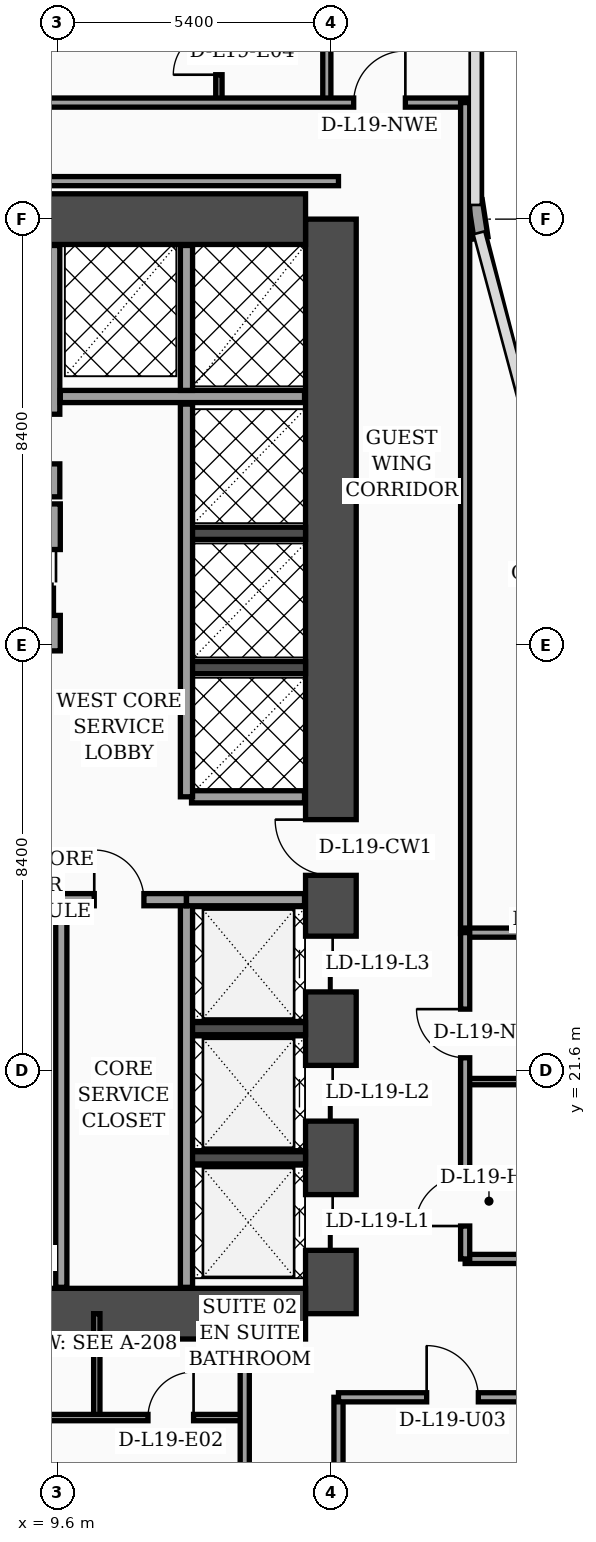
"""IFC4 building model, lengths in metres.
Left out: names, types, materials, properties, quantities, classifications, styles, units other than length and angle.
Written with IfcOpenShell. Run it as: python <this file> out.ifc"""

import sys

from ifc_helpers import new_model, si_unit, direction, frame, frame_2d, origin, place, context, subcontext, project, spatial, rectangle, extrude, element, fill, save


model = new_model("IFC4")
c1 = context("Model", 3, precision=1e-05, world=origin(), true_north=direction((0.0, 1.0)))
c2 = subcontext(c1, "Body", "Model", "MODEL_VIEW")
j1 = project(units=[si_unit("LENGTHUNIT", "METRE"), si_unit("PLANEANGLEUNIT", "RADIAN")], contexts=[c1])
p1 = place(None, origin())
s1 = spatial("IfcSite", under=j1, at=p1, CompositionType="ELEMENT")
p2 = place(p1, origin())
s2 = spatial("IfcBuilding", under=s1, at=p2, CompositionType="ELEMENT")
p3 = place(p2, frame((0.0, 0.0, 81.2)))
s3 = spatial("IfcBuildingStorey", under=s2, at=p3, CompositionType="ELEMENT", Elevation=81.2)
p4 = place(p3, frame((15.0, 16.8, 0.0), z_axis=(0.0, 0.0, 1.0), x_axis=(0.0, 1.0, 0.0)))
e1 = element("IfcWall", 1, at=p4, inside=s3, PredefinedType="SHEAR", context=c2, shape_type="SweptSolid", body=[
    extrude(rectangle(XDim=21.6, YDim=1.0, at=frame_2d((10.8, 0.0))), origin(), (0.0, 0.0, 1.0), 3.56),
])
p5 = place(p4, frame((8.65, 0.0, 0.0)))
e2 = element("IfcOpeningElement", 2, at=p5, cuts=e1, PredefinedType="OPENING", context=c2, shape_type="SweptSolid", body=[
    extrude(rectangle(XDim=1.1, YDim=2.2, at=frame_2d((0.55, 1.1))), frame((0.0, 0.51, 0.0), z_axis=(0.0, -1.0, 0.0), x_axis=(1.0, 0.0, 0.0)), (0.0, 0.0, 1.0), 1.02),
])
p6 = place(p4, frame((1.25, 0.0, 0.0)))
e3 = element("IfcOpeningElement", 3, at=p6, cuts=e1, PredefinedType="OPENING", context=c2, shape_type="SweptSolid", body=[
    extrude(rectangle(XDim=1.1, YDim=2.2, at=frame_2d((0.55, 1.1))), frame((0.0, 0.51, 0.0), z_axis=(0.0, -1.0, 0.0), x_axis=(1.0, 0.0, 0.0)), (0.0, 0.0, 1.0), 1.02),
])
p7 = place(p4, frame((3.8, 0.0, 0.0)))
e4 = element("IfcOpeningElement", 4, at=p7, cuts=e1, PredefinedType="OPENING", context=c2, shape_type="SweptSolid", body=[
    extrude(rectangle(XDim=1.1, YDim=2.2, at=frame_2d((0.55, 1.1))), frame((0.0, 0.51, 0.0), z_axis=(0.0, -1.0, 0.0), x_axis=(1.0, 0.0, 0.0)), (0.0, 0.0, 1.0), 1.02),
])
p8 = place(p4, frame((6.35, 0.0, 0.0)))
e5 = element("IfcOpeningElement", 5, at=p8, cuts=e1, PredefinedType="OPENING", context=c2, shape_type="SweptSolid", body=[
    extrude(rectangle(XDim=1.1, YDim=2.2, at=frame_2d((0.55, 1.1))), frame((0.0, 0.51, 0.0), z_axis=(0.0, -1.0, 0.0), x_axis=(1.0, 0.0, 0.0)), (0.0, 0.0, 1.0), 1.02),
])
for number, where, z_axis, x_axis in (
    (6, (4.7, 38.4, 0.0), (0.0, 0.0, 1.0), (1.0, 0.0, 0.0)),
    (7, (4.7, 16.8, 0.0), (0.0, 0.0, 1.0), (1.0, 0.0, 0.0)),
):
    element("IfcWall", number, at=place(p3, frame(where, z_axis=z_axis, x_axis=x_axis)), inside=s3, PredefinedType="SHEAR", context=c2, shape_type="SweptSolid", body=[
        extrude(rectangle(XDim=9.8, YDim=1.0, at=frame_2d((4.9, 0.0))), origin(), (0.0, 0.0, 1.0), 3.56),
    ])
for number, where, z_axis, x_axis in (
    (8, (12.18, 19.875, 0.0), (0.0, 0.0, 1.0), (1.0, 0.0, 0.0)),
    (9, (12.18, 22.425, 0.0), (0.0, 0.0, 1.0), (1.0, 0.0, 0.0)),
    (10, (12.18, 29.55, 0.0), (0.0, 0.0, 1.0), (1.0, 0.0, 0.0)),
    (11, (12.18, 32.2, 0.0), (0.0, 0.0, 1.0), (1.0, 0.0, 0.0)),
):
    element("IfcWall", number, at=place(p3, frame(where, z_axis=z_axis, x_axis=x_axis)), inside=s3, PredefinedType="SOLIDWALL", context=c2, shape_type="SweptSolid", body=[
        extrude(rectangle(XDim=2.32, YDim=0.24, at=frame_2d((1.16, 0.0))), origin(), (0.0, 0.0, 1.0), 3.56),
    ])
p9 = place(p3, frame((17.962, 38.03, 0.0), z_axis=(0.0, 0.0, 1.0), x_axis=(-0.15141125477, 0.988470855377, 0.0)))
e12 = element("IfcWall", 12, at=p9, inside=s3, PredefinedType="SOLIDWALL", context=c2, shape_type="SweptSolid", body=[
    extrude(rectangle(XDim=0.739, YDim=0.28, at=frame_2d((0.369, 0.0))), origin(), (0.0, 0.0, 1.0), 3.56),
])
p10 = place(p3, frame((9.54, 29.88, 0.0), z_axis=(0.0, 0.0, 1.0), x_axis=(0.0, 1.0, 0.0)))
e13 = element("IfcWall", 13, at=p10, inside=s3, PredefinedType="SOLIDWALL", context=c2, shape_type="SweptSolid", body=[
    extrude(rectangle(XDim=2.9, YDim=0.24, at=frame_2d((1.45, 0.0))), origin(), (0.0, 0.0, 1.0), 3.56),
])
p11 = place(p10, frame((0.7, 0.0, 0.0)))
e14 = element("IfcOpeningElement", 14, at=p11, cuts=e13, PredefinedType="OPENING", context=c2, shape_type="SweptSolid", body=[
    extrude(rectangle(XDim=1.3, YDim=2.35, at=frame_2d((0.65, 1.175))), frame((0.0, 0.13, 0.0), z_axis=(0.0, -1.0, 0.0), x_axis=(1.0, 0.0, 0.0)), (0.0, 0.0, 1.0), 0.26),
])
p12 = place(p3, frame((9.68, 17.32, 0.0), z_axis=(0.0, 0.0, 1.0), x_axis=(0.0, 1.0, 0.0)))
e15 = element("IfcWall", 15, at=p12, inside=s3, PredefinedType="SOLIDWALL", context=c2, shape_type="SweptSolid", body=[
    extrude(rectangle(XDim=7.68, YDim=0.22, at=frame_2d((3.84, 0.0))), origin(), (0.0, 0.0, 1.0), 3.56),
])
p13 = place(p3, frame((9.54, 32.92, 0.0), z_axis=(0.0, 0.0, 1.0), x_axis=(0.0, 1.0, 0.0)))
e16 = element("IfcWall", 16, at=p13, inside=s3, PredefinedType="SOLIDWALL", context=c2, shape_type="SweptSolid", body=[
    extrude(rectangle(XDim=4.96, YDim=0.22, at=frame_2d((2.48, 0.0))), origin(), (0.0, 0.0, 1.0), 3.56),
])
p14 = place(p13, frame((0.65, 0.0, 0.0)))
e17 = element("IfcOpeningElement", 17, at=p14, cuts=e16, PredefinedType="OPENING", context=c2, shape_type="SweptSolid", body=[
    extrude(rectangle(XDim=0.98, YDim=2.15, at=frame_2d((0.49, 1.075))), frame((0.0, 0.12, 0.0), z_axis=(0.0, -1.0, 0.0), x_axis=(1.0, 0.0, 0.0)), (0.0, 0.0, 1.0), 0.24),
])
p15 = place(p3, frame((12.15, 17.32, 0.0), z_axis=(0.0, 0.0, 1.0), x_axis=(0.0, 1.0, 0.0)))
e18 = element("IfcWall", 18, at=p15, inside=s3, PredefinedType="SOLIDWALL", context=c2, shape_type="SweptSolid", body=[
    extrude(rectangle(XDim=7.65, YDim=0.24, at=frame_2d((3.825, 0.0))), origin(), (0.0, 0.0, 1.0), 3.56),
])
p16 = place(p3, frame((9.68, 24.97, 0.0), z_axis=(0.0, 0.0, 1.0), x_axis=(1.0, 0.0, 0.0)))
e19 = element("IfcWall", 19, at=p16, inside=s3, PredefinedType="SOLIDWALL", context=c2, shape_type="SweptSolid", body=[
    extrude(rectangle(XDim=2.47, YDim=0.24, at=frame_2d((1.235, 0.0))), origin(), (0.0, 0.0, 1.0), 3.56),
])
p17 = place(p16, frame((0.65, 0.0, 0.0)))
e20 = element("IfcOpeningElement", 20, at=p17, cuts=e19, PredefinedType="OPENING", context=c2, shape_type="SweptSolid", body=[
    extrude(rectangle(XDim=0.98, YDim=2.15, at=frame_2d((0.49, 1.075))), frame((0.0, 0.13, 0.0), z_axis=(0.0, -1.0, 0.0), x_axis=(1.0, 0.0, 0.0)), (0.0, 0.0, 1.0), 0.26),
])
p18 = place(p3, frame((12.15, 24.97, 0.0), z_axis=(0.0, 0.0, 1.0), x_axis=(1.0, 0.0, 0.0)))
e21 = element("IfcWall", 21, at=p18, inside=s3, PredefinedType="SOLIDWALL", context=c2, shape_type="SweptSolid", body=[
    extrude(rectangle(XDim=2.33, YDim=0.24, at=frame_2d((1.165, 0.0))), origin(), (0.0, 0.0, 1.0), 2.84),
])
p19 = place(p3, frame((12.25, 27.0, 0.0), z_axis=(0.0, 0.0, 1.0), x_axis=(1.0, 0.0, 0.0)))
e22 = element("IfcWall", 22, at=p19, inside=s3, PredefinedType="SOLIDWALL", context=c2, shape_type="SweptSolid", body=[
    extrude(rectangle(XDim=2.23, YDim=0.24, at=frame_2d((1.115, 0.0))), origin(), (0.0, 0.0, 1.0), 3.56),
])
p20 = place(p3, frame((12.15, 27.0, 0.0), z_axis=(0.0, 0.0, 1.0), x_axis=(0.0, 1.0, 0.0)))
e23 = element("IfcWall", 23, at=p20, inside=s3, PredefinedType="SOLIDWALL", context=c2, shape_type="SweptSolid", body=[
    extrude(rectangle(XDim=7.75, YDim=0.24, at=frame_2d((3.875, 0.0))), origin(), (0.0, 0.0, 1.0), 3.56),
])
p21 = place(p3, frame((9.66, 34.9, 0.0), z_axis=(0.0, 0.0, 1.0), x_axis=(1.0, 0.0, 0.0)))
e24 = element("IfcWall", 24, at=p21, inside=s3, PredefinedType="SOLIDWALL", context=c2, shape_type="SweptSolid", body=[
    extrude(rectangle(XDim=4.82, YDim=0.24, at=frame_2d((2.41, 0.0))), origin(), (0.0, 0.0, 1.0), 3.56),
])
p22 = place(p3, frame((12.15, 35.02, 0.0), z_axis=(0.0, 0.0, 1.0), x_axis=(0.0, 1.0, 0.0)))
e25 = element("IfcWall", 25, at=p22, inside=s3, PredefinedType="SOLIDWALL", context=c2, shape_type="SweptSolid", body=[
    extrude(rectangle(XDim=2.86, YDim=0.24, at=frame_2d((1.43, 0.0))), origin(), (0.0, 0.0, 1.0), 3.56),
])
p23 = place(p3, frame((10.38, 14.75, 0.0), z_axis=(0.0, 0.0, 1.0), x_axis=(0.0, 1.0, 0.0)))
e26 = element("IfcWall", 26, at=p23, inside=s3, PredefinedType="PARTITIONING", context=c2, shape_type="SweptSolid", body=[
    extrude(rectangle(XDim=2.05, YDim=0.125, at=frame_2d((1.025, 0.0))), origin(), (0.0, 0.0, 1.0), 3.56),
])
p24 = place(p3, frame((0.08, 14.75, 0.0), z_axis=(0.0, 0.0, 1.0), x_axis=(1.0, 0.0, 0.0)))
e27 = element("IfcWall", 27, at=p24, inside=s3, PredefinedType="PARTITIONING", context=c2, shape_type="SweptSolid", body=[
    extrude(rectangle(XDim=13.22, YDim=0.125, at=frame_2d((6.61, 0.0))), origin(), (0.0, 0.0, 1.0), 2.84),
])
p25 = place(p24, frame((4.67, 0.0, 0.0)))
e28 = element("IfcOpeningElement", 28, at=p25, cuts=e27, PredefinedType="OPENING", context=c2, shape_type="SweptSolid", body=[
    extrude(rectangle(XDim=0.96, YDim=2.2, at=frame_2d((0.48, 1.1))), frame((0.0, 0.073, 0.0), z_axis=(0.0, -1.0, 0.0), x_axis=(1.0, 0.0, 0.0)), (0.0, 0.0, 1.0), 0.145),
])
p26 = place(p24, frame((11.31, 0.0, 0.0)))
e29 = element("IfcOpeningElement", 29, at=p26, cuts=e27, PredefinedType="OPENING", context=c2, shape_type="SweptSolid", body=[
    extrude(rectangle(XDim=0.9, YDim=2.15, at=frame_2d((0.45, 1.075))), frame((0.0, 0.073, 0.0), z_axis=(0.0, -1.0, 0.0), x_axis=(1.0, 0.0, 0.0)), (0.0, 0.0, 1.0), 0.145),
])
p27 = place(p3, frame((13.3, 2.44, 0.0), z_axis=(0.0, 0.0, 1.0), x_axis=(0.0, 1.0, 0.0)))
e30 = element("IfcWall", 30, at=p27, inside=s3, PredefinedType="PARTITIONING", context=c2, shape_type="SweptSolid", body=[
    extrude(rectangle(XDim=14.36, YDim=0.18, at=frame_2d((7.18, 0.0))), origin(), (0.0, 0.0, 1.0), 3.04),
])
p28 = place(p27, frame((3.01, 0.0, 0.0)))
e31 = element("IfcOpeningElement", 31, at=p28, cuts=e30, PredefinedType="OPENING", context=c2, shape_type="SweptSolid", body=[
    extrude(rectangle(XDim=1.02, YDim=2.2, at=frame_2d((0.51, 1.1))), frame((0.0, 0.1, 0.0), z_axis=(0.0, -1.0, 0.0), x_axis=(1.0, 0.0, 0.0)), (0.0, 0.0, 1.0), 0.2),
])
p29 = place(p27, frame((9.95, 0.0, 0.0)))
e32 = element("IfcOpeningElement", 32, at=p29, cuts=e30, PredefinedType="OPENING", context=c2, shape_type="SweptSolid", body=[
    extrude(rectangle(XDim=1.02, YDim=2.2, at=frame_2d((0.51, 1.1))), frame((0.0, 0.1, 0.0), z_axis=(0.0, -1.0, 0.0), x_axis=(1.0, 0.0, 0.0)), (0.0, 0.0, 1.0), 0.2),
])
p30 = place(p3, frame((15.15, 2.44, 0.0), z_axis=(0.0, 0.0, 1.0), x_axis=(0.0, 1.0, 0.0)))
e33 = element("IfcWall", 33, at=p30, inside=s3, PredefinedType="PARTITIONING", context=c2, shape_type="SweptSolid", body=[
    extrude(rectangle(XDim=12.71, YDim=0.18, at=frame_2d((6.355, 0.0))), origin(), (0.0, 0.0, 1.0), 3.04),
])
p31 = place(p3, frame((15.15, 15.15, 0.0), z_axis=(0.0, 0.0, 1.0), x_axis=(1.0, 0.0, 0.0)))
e34 = element("IfcWall", 34, at=p31, inside=s3, PredefinedType="PARTITIONING", context=c2, shape_type="SweptSolid", body=[
    extrude(rectangle(XDim=6.45, YDim=0.18, at=frame_2d((3.225, 0.0))), origin(), (0.0, 0.0, 1.0), 2.34),
])
p32 = place(p31, frame((1.74, 0.0, 0.0)))
e35 = element("IfcOpeningElement", 35, at=p32, cuts=e34, PredefinedType="OPENING", context=c2, shape_type="SweptSolid", body=[
    extrude(rectangle(XDim=1.02, YDim=2.2, at=frame_2d((0.51, 1.1))), frame((0.0, 0.1, 0.0), z_axis=(0.0, -1.0, 0.0), x_axis=(1.0, 0.0, 0.0)), (0.0, 0.0, 1.0), 0.2),
])
p33 = place(p3, frame((14.92, 40.7, 0.0), z_axis=(0.0, 0.0, 1.0), x_axis=(0.0, 1.0, 0.0)))
e36 = element("IfcWall", 36, at=p33, inside=s3, PredefinedType="PARTITIONING", context=c2, shape_type="SweptSolid", body=[
    extrude(rectangle(XDim=7.1, YDim=0.16, at=frame_2d((3.55, 0.0))), origin(), (0.0, 0.0, 1.0), 3.04),
])
p34 = place(p3, frame((12.79, 40.7, 0.0), z_axis=(0.0, 0.0, 1.0), x_axis=(0.0, 1.0, 0.0)))
e37 = element("IfcWall", 37, at=p34, inside=s3, PredefinedType="PARTITIONING", context=c2, shape_type="SweptSolid", body=[
    extrude(rectangle(XDim=10.24, YDim=0.125, at=frame_2d((5.12, 0.0))), origin(), (0.0, 0.0, 1.0), 3.04),
])
p35 = place(p34, frame((0.55, 0.0, 0.0)))
e38 = element("IfcOpeningElement", 38, at=p35, cuts=e37, PredefinedType="OPENING", context=c2, shape_type="SweptSolid", body=[
    extrude(rectangle(XDim=0.9, YDim=2.15, at=frame_2d((0.45, 1.075))), frame((0.0, 0.073, 0.0), z_axis=(0.0, -1.0, 0.0), x_axis=(1.0, 0.0, 0.0)), (0.0, 0.0, 1.0), 0.145),
])
p36 = place(p34, frame((3.62, 0.0, 0.0)))
e39 = element("IfcOpeningElement", 39, at=p36, cuts=e37, PredefinedType="OPENING", context=c2, shape_type="SweptSolid", body=[
    extrude(rectangle(XDim=0.96, YDim=2.2, at=frame_2d((0.48, 1.1))), frame((0.0, 0.073, 0.0), z_axis=(0.0, -1.0, 0.0), x_axis=(1.0, 0.0, 0.0)), (0.0, 0.0, 1.0), 0.145),
])
p37 = place(p3, frame((0.08, 40.7, 0.0), z_axis=(0.0, 0.0, 1.0), x_axis=(1.0, 0.0, 0.0)))
e40 = element("IfcWall", 40, at=p37, inside=s3, PredefinedType="PARTITIONING", context=c2, shape_type="SweptSolid", body=[
    extrude(rectangle(XDim=17.77, YDim=0.18, at=frame_2d((8.885, 0.0))), origin(), (0.0, 0.0, 1.0), 2.84),
])
p38 = place(p37, frame((0.9, 0.0, 0.0)))
e41 = element("IfcOpeningElement", 41, at=p38, cuts=e40, PredefinedType="OPENING", context=c2, shape_type="SweptSolid", body=[
    extrude(rectangle(XDim=1.02, YDim=2.2, at=frame_2d((0.51, 1.1))), frame((0.0, 0.1, 0.0), z_axis=(0.0, -1.0, 0.0), x_axis=(1.0, 0.0, 0.0)), (0.0, 0.0, 1.0), 0.2),
])
p39 = place(p37, frame((7.38, 0.0, 0.0)))
e42 = element("IfcOpeningElement", 42, at=p39, cuts=e40, PredefinedType="OPENING", context=c2, shape_type="SweptSolid", body=[
    extrude(rectangle(XDim=1.02, YDim=2.2, at=frame_2d((0.51, 1.1))), frame((0.0, 0.1, 0.0), z_axis=(0.0, -1.0, 0.0), x_axis=(1.0, 0.0, 0.0)), (0.0, 0.0, 1.0), 0.2),
])
p40 = place(p37, frame((15.37, 0.0, 0.0)))
e43 = element("IfcOpeningElement", 43, at=p40, cuts=e40, PredefinedType="OPENING", context=c2, shape_type="SweptSolid", body=[
    extrude(rectangle(XDim=1.02, YDim=2.2, at=frame_2d((0.51, 1.1))), frame((0.0, 0.1, 0.0), z_axis=(0.0, -1.0, 0.0), x_axis=(1.0, 0.0, 0.0)), (0.0, 0.0, 1.0), 0.2),
])
p41 = place(p3, frame((17.65, 24.3, 0.0), z_axis=(0.0, 0.0, 1.0), x_axis=(0.0, 1.0, 0.0)))
e44 = element("IfcWall", 44, at=p41, inside=s3, PredefinedType="PARTITIONING", context=c2, shape_type="SweptSolid", body=[
    extrude(rectangle(XDim=16.4, YDim=0.18, at=frame_2d((8.2, 0.0))), origin(), (0.0, 0.0, 1.0), 2.84),
])
p42 = place(p3, frame((3.68, 39.15, 0.0), z_axis=(0.0, 0.0, 1.0), x_axis=(1.0, 0.0, 0.0)))
e45 = element("IfcWall", 45, at=p42, inside=s3, PredefinedType="PARTITIONING", context=c2, shape_type="SweptSolid", body=[
    extrude(rectangle(XDim=11.47, YDim=0.18, at=frame_2d((5.735, 0.0))), origin(), (0.0, 0.0, 1.0), 2.84),
])
p43 = place(p3, frame((17.65, 17.88, 0.0), z_axis=(0.0, 0.0, 1.0), x_axis=(1.0, 0.0, 0.0)))
e46 = element("IfcWall", 46, at=p43, inside=s3, PredefinedType="PARTITIONING", context=c2, shape_type="SweptSolid", body=[
    extrude(rectangle(XDim=3.9, YDim=0.18, at=frame_2d((1.95, 0.0))), origin(), (0.0, 0.0, 1.0), 3.09),
])
p44 = place(p3, frame((17.65, 21.38, 0.0), z_axis=(0.0, 0.0, 1.0), x_axis=(1.0, 0.0, 0.0)))
e47 = element("IfcWall", 47, at=p44, inside=s3, PredefinedType="PARTITIONING", context=c2, shape_type="SweptSolid", body=[
    extrude(rectangle(XDim=3.9, YDim=0.125, at=frame_2d((1.95, 0.0))), origin(), (0.0, 0.0, 1.0), 3.56),
])
p45 = place(p3, frame((17.65, 24.32, 0.0), z_axis=(0.0, 0.0, 1.0), x_axis=(1.0, 0.0, 0.0)))
e48 = element("IfcWall", 48, at=p45, inside=s3, PredefinedType="PARTITIONING", context=c2, shape_type="SweptSolid", body=[
    extrude(rectangle(XDim=3.95, YDim=0.18, at=frame_2d((1.975, 0.0))), origin(), (0.0, 0.0, 1.0), 3.56),
])
p46 = place(p3, frame((17.65, 17.88, 0.0), z_axis=(0.0, 0.0, 1.0), x_axis=(0.0, 1.0, 0.0)))
e49 = element("IfcWall", 49, at=p46, inside=s3, PredefinedType="PARTITIONING", context=c2, shape_type="SweptSolid", body=[
    extrude(rectangle(XDim=6.44, YDim=0.18, at=frame_2d((3.22, 0.0))), origin(), (0.0, 0.0, 1.0), 3.09),
])
p47 = place(p46, frame((0.65, 0.0, 0.0)))
e50 = element("IfcOpeningElement", 50, at=p47, cuts=e49, PredefinedType="OPENING", context=c2, shape_type="SweptSolid", body=[
    extrude(rectangle(XDim=0.98, YDim=2.15, at=frame_2d((0.49, 1.075))), frame((0.0, 0.1, 0.0), z_axis=(0.0, -1.0, 0.0), x_axis=(1.0, 0.0, 0.0)), (0.0, 0.0, 1.0), 0.2),
])
p48 = place(p46, frame((3.97, 0.0, 0.0)))
e51 = element("IfcOpeningElement", 51, at=p48, cuts=e49, PredefinedType="OPENING", context=c2, shape_type="SweptSolid", body=[
    extrude(rectangle(XDim=0.96, YDim=2.2, at=frame_2d((0.48, 1.1))), frame((0.0, 0.1, 0.0), z_axis=(0.0, -1.0, 0.0), x_axis=(1.0, 0.0, 0.0)), (0.0, 0.0, 1.0), 0.2),
])
p49 = place(p11, origin())
e52 = element("IfcDoor", 52, at=p49, inside=s3, OperationType="DOUBLE_DOOR_SLIDING", PredefinedType="DOOR", context=c2, shape_type="SweptSolid", body=[
    extrude(rectangle(XDim=1.3, YDim=2.35, at=frame_2d((0.65, 1.175))), frame((0.0, 0.025, 0.0), z_axis=(0.0, -1.0, 0.0), x_axis=(1.0, 0.0, 0.0)), (0.0, 0.0, 1.0), 0.05),
])
fill(e14, e52)
p50 = place(p14, origin())
e53 = element("IfcDoor", 53, at=p50, inside=s3, OperationType="SINGLE_SWING_LEFT", PredefinedType="DOOR", context=c2, shape_type="SweptSolid", body=[
    extrude(rectangle(XDim=0.98, YDim=2.15, at=frame_2d((0.49, 1.075))), frame((0.0, 0.025, 0.0), z_axis=(0.0, -1.0, 0.0), x_axis=(1.0, 0.0, 0.0)), (0.0, 0.0, 1.0), 0.05),
])
fill(e17, e53)
p51 = place(p17, origin())
e54 = element("IfcDoor", 54, at=p51, inside=s3, OperationType="SINGLE_SWING_LEFT", PredefinedType="DOOR", context=c2, shape_type="SweptSolid", body=[
    extrude(rectangle(XDim=0.98, YDim=2.15, at=frame_2d((0.49, 1.075))), frame((0.0, 0.025, 0.0), z_axis=(0.0, -1.0, 0.0), x_axis=(1.0, 0.0, 0.0)), (0.0, 0.0, 1.0), 0.05),
])
fill(e20, e54)
p52 = place(p26, origin())
e55 = element("IfcDoor", 55, at=p52, inside=s3, OperationType="SINGLE_SWING_RIGHT", PredefinedType="DOOR", context=c2, shape_type="SweptSolid", body=[
    extrude(rectangle(XDim=0.9, YDim=2.15, at=frame_2d((0.45, 1.075))), frame((0.0, 0.025, 0.0), z_axis=(0.0, -1.0, 0.0), x_axis=(1.0, 0.0, 0.0)), (0.0, 0.0, 1.0), 0.05),
])
fill(e29, e55)
p53 = place(p32, origin())
e56 = element("IfcDoor", 56, at=p53, inside=s3, OperationType="SINGLE_SWING_LEFT", PredefinedType="DOOR", context=c2, shape_type="SweptSolid", body=[
    extrude(rectangle(XDim=1.02, YDim=2.2, at=frame_2d((0.51, 1.1))), frame((0.0, 0.025, 0.0), z_axis=(0.0, -1.0, 0.0), x_axis=(1.0, 0.0, 0.0)), (0.0, 0.0, 1.0), 0.05),
])
fill(e35, e56)
p54 = place(p35, origin())
e57 = element("IfcDoor", 57, at=p54, inside=s3, OperationType="SINGLE_SWING_LEFT", PredefinedType="DOOR", context=c2, shape_type="SweptSolid", body=[
    extrude(rectangle(XDim=0.9, YDim=2.15, at=frame_2d((0.45, 1.075))), frame((0.0, 0.025, 0.0), z_axis=(0.0, -1.0, 0.0), x_axis=(1.0, 0.0, 0.0)), (0.0, 0.0, 1.0), 0.05),
])
fill(e38, e57)
p55 = place(p40, origin())
e58 = element("IfcDoor", 58, at=p55, inside=s3, OperationType="SINGLE_SWING_RIGHT", PredefinedType="DOOR", context=c2, shape_type="SweptSolid", body=[
    extrude(rectangle(XDim=1.02, YDim=2.2, at=frame_2d((0.51, 1.1))), frame((0.0, 0.025, 0.0), z_axis=(0.0, -1.0, 0.0), x_axis=(1.0, 0.0, 0.0)), (0.0, 0.0, 1.0), 0.05),
])
fill(e43, e58)
p56 = place(p47, origin())
e59 = element("IfcDoor", 59, at=p56, inside=s3, OperationType="SINGLE_SWING_LEFT", PredefinedType="DOOR", context=c2, shape_type="SweptSolid", body=[
    extrude(rectangle(XDim=0.98, YDim=2.15, at=frame_2d((0.49, 1.075))), frame((0.0, 0.025, 0.0), z_axis=(0.0, -1.0, 0.0), x_axis=(1.0, 0.0, 0.0)), (0.0, 0.0, 1.0), 0.05),
])
fill(e50, e59)
p57 = place(p48, origin())
e60 = element("IfcDoor", 60, at=p57, inside=s3, OperationType="SINGLE_SWING_RIGHT", PredefinedType="DOOR", context=c2, shape_type="SweptSolid", body=[
    extrude(rectangle(XDim=0.96, YDim=2.2, at=frame_2d((0.48, 1.1))), frame((0.0, 0.025, 0.0), z_axis=(0.0, -1.0, 0.0), x_axis=(1.0, 0.0, 0.0)), (0.0, 0.0, 1.0), 0.05),
])
fill(e51, e60)
p58 = place(p5, origin())
e61 = element("IfcDoor", 61, at=p58, inside=s3, OperationType="SINGLE_SWING_RIGHT", PredefinedType="DOOR", context=c2, shape_type="SweptSolid", body=[
    extrude(rectangle(XDim=1.1, YDim=2.2, at=frame_2d((0.55, 1.1))), frame((0.0, 0.025, 0.0), z_axis=(0.0, -1.0, 0.0), x_axis=(1.0, 0.0, 0.0)), (0.0, 0.0, 1.0), 0.05),
])
fill(e2, e61)
p59 = place(p6, origin())
e62 = element("IfcDoor", 62, at=p59, inside=s3, OperationType="DOUBLE_DOOR_SLIDING", PredefinedType="DOOR", context=c2, shape_type="SweptSolid", body=[
    extrude(rectangle(XDim=1.1, YDim=2.2, at=frame_2d((0.55, 1.1))), frame((0.0, 0.025, 0.0), z_axis=(0.0, -1.0, 0.0), x_axis=(1.0, 0.0, 0.0)), (0.0, 0.0, 1.0), 0.05),
])
fill(e3, e62)
p60 = place(p7, origin())
e63 = element("IfcDoor", 63, at=p60, inside=s3, OperationType="DOUBLE_DOOR_SLIDING", PredefinedType="DOOR", context=c2, shape_type="SweptSolid", body=[
    extrude(rectangle(XDim=1.1, YDim=2.2, at=frame_2d((0.55, 1.1))), frame((0.0, 0.025, 0.0), z_axis=(0.0, -1.0, 0.0), x_axis=(1.0, 0.0, 0.0)), (0.0, 0.0, 1.0), 0.05),
])
fill(e4, e63)
p61 = place(p8, origin())
e64 = element("IfcDoor", 64, at=p61, inside=s3, OperationType="DOUBLE_DOOR_SLIDING", PredefinedType="DOOR", context=c2, shape_type="SweptSolid", body=[
    extrude(rectangle(XDim=1.1, YDim=2.2, at=frame_2d((0.55, 1.1))), frame((0.0, 0.025, 0.0), z_axis=(0.0, -1.0, 0.0), x_axis=(1.0, 0.0, 0.0)), (0.0, 0.0, 1.0), 0.05),
])
fill(e5, e64)
save(model, sys.argv[1])
